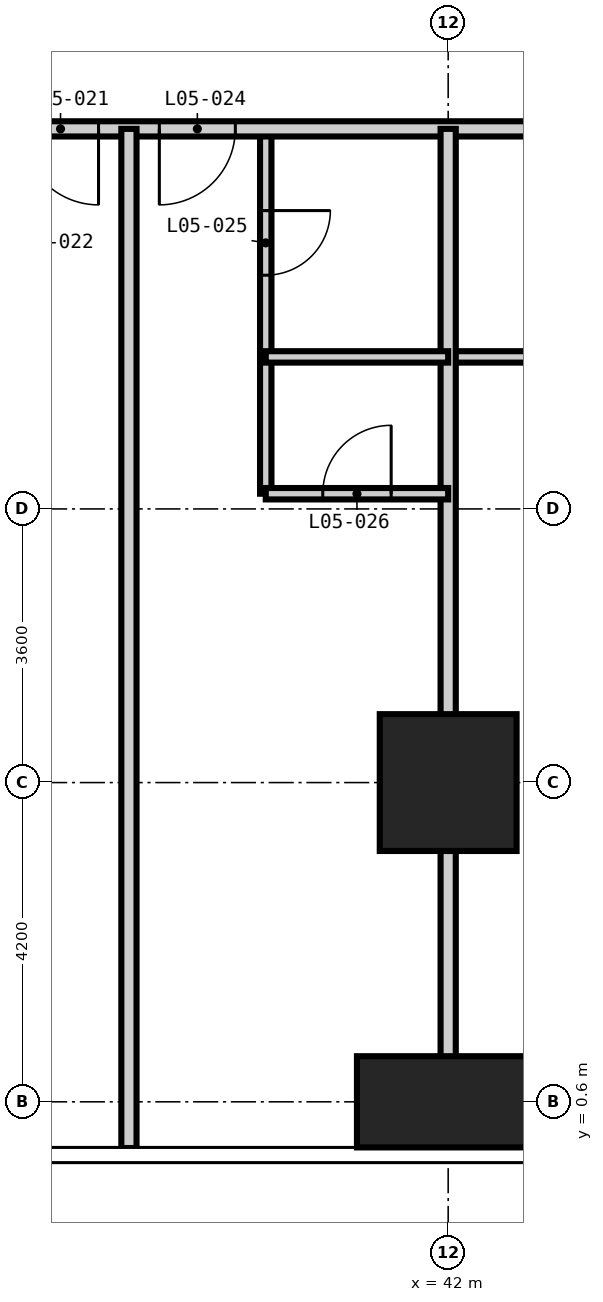
"""IFC4 building model, lengths in metres.
Left out: names, types, materials, properties, quantities, classifications, styles, units other than length and angle.
Written with IfcOpenShell. Run it as: python <this file> out.ifc"""

import sys

from ifc_helpers import new_model, si_unit, direction, frame, frame_2d, origin, origin_2d, place, context, subcontext, project, spatial, rectangle, extrude, element, fill, save


model = new_model("IFC4")
c1 = context("Model", 3, precision=1e-05, world=origin(), true_north=direction((0.0, 1.0)))
c2 = subcontext(c1, "Body", "Model", "MODEL_VIEW")
j1 = project(units=[si_unit("LENGTHUNIT", "METRE"), si_unit("PLANEANGLEUNIT", "RADIAN")], contexts=[c1])
p1 = place(None, origin())
s1 = spatial("IfcSite", under=j1, at=p1, CompositionType="ELEMENT")
p2 = place(p1, origin())
s2 = spatial("IfcBuilding", under=s1, at=p2, CompositionType="ELEMENT")
p3 = place(p2, frame((0.0, 0.0, 27.0)))
s3 = spatial("IfcBuildingStorey", under=s2, at=p3, CompositionType="ELEMENT", Elevation=27.0)
p4 = place(p3, frame((42.0, 0.6, -0.35), z_axis=(0.0, 0.0, 1.0), x_axis=(1.0, 0.0, 0.0)))
e1 = element("IfcColumn", 1, at=p4, inside=s3, PredefinedType="COLUMN", context=c2, shape_type="SweptSolid", body=[
    extrude(rectangle(XDim=2.4, YDim=1.2, at=origin_2d()), origin(), (0.0, 0.0, 1.0), 3.6),
])
p5 = place(p3, frame((42.0, 4.8, -0.35), z_axis=(0.0, 0.0, 1.0), x_axis=(1.0, 0.0, 0.0)))
e2 = element("IfcColumn", 2, at=p5, inside=s3, PredefinedType="COLUMN", context=c2, shape_type="SweptSolid", body=[
    extrude(rectangle(XDim=1.8, YDim=1.8, at=origin_2d()), origin(), (0.0, 0.0, 1.0), 3.6),
])
p6 = place(p3, frame((39.6, 10.4, 0.0), z_axis=(0.0, 0.0, 1.0), x_axis=(0.0, 1.0, 0.0)))
e3 = element("IfcWall", 3, at=p6, inside=s3, PredefinedType="PARTITIONING", context=c2, shape_type="SweptSolid", body=[
    extrude(rectangle(XDim=3.0, YDim=0.15, at=frame_2d((1.5, 0.0))), origin(), (0.0, 0.0, 1.0), 3.25),
])
p7 = place(p6, frame((1.075, 0.0, 0.0)))
e4 = element("IfcOpeningElement", 4, at=p7, cuts=e3, PredefinedType="OPENING", context=c2, shape_type="SweptSolid", body=[
    extrude(rectangle(XDim=0.85, YDim=2.1, at=frame_2d((0.425, 1.05))), frame((0.0, 0.085, 0.0), z_axis=(0.0, -1.0, 0.0), x_axis=(1.0, 0.0, 0.0)), (0.0, 0.0, 1.0), 0.17),
])
p8 = place(p3, frame((42.0, 10.4, 0.0), z_axis=(0.0, 0.0, 1.0), x_axis=(1.0, 0.0, 0.0)))
e5 = element("IfcWall", 5, at=p8, inside=s3, PredefinedType="PARTITIONING", context=c2, shape_type="SweptSolid", body=[
    extrude(rectangle(XDim=3.7, YDim=0.15, at=frame_2d((1.85, 0.0))), origin(), (0.0, 0.0, 1.0), 3.25),
])
p9 = place(p8, frame((1.425, 0.0, 0.0)))
e6 = element("IfcOpeningElement", 6, at=p9, cuts=e5, PredefinedType="OPENING", context=c2, shape_type="SweptSolid", body=[
    extrude(rectangle(XDim=0.85, YDim=2.1, at=frame_2d((0.425, 1.05))), frame((0.0, 0.085, 0.0), z_axis=(0.0, -1.0, 0.0), x_axis=(1.0, 0.0, 0.0)), (0.0, 0.0, 1.0), 0.17),
])
p10 = place(p3, frame((45.7, 13.4, 0.0), z_axis=(0.0, 0.0, 1.0), x_axis=(-1.0, 0.0, 0.0)))
e7 = element("IfcWall", 7, at=p10, inside=s3, PredefinedType="PARTITIONING", context=c2, shape_type="SweptSolid", body=[
    extrude(rectangle(XDim=32.3, YDim=0.2, at=frame_2d((16.15, 0.0))), origin(), (0.0, 0.0, 1.0), 3.25),
])
p11 = place(p10, frame((25.1, 0.0, 0.0)))
e8 = element("IfcOpeningElement", 8, at=p11, cuts=e7, PredefinedType="OPENING", context=c2, shape_type="SweptSolid", body=[
    extrude(rectangle(XDim=1.0, YDim=2.2, at=frame_2d((0.5, 1.1))), frame((0.0, 0.11, 0.0), z_axis=(0.0, -1.0, 0.0), x_axis=(1.0, 0.0, 0.0)), (0.0, 0.0, 1.0), 0.22),
])
p12 = place(p10, frame((23.3, 0.0, 0.0)))
e9 = element("IfcOpeningElement", 9, at=p12, cuts=e7, PredefinedType="OPENING", context=c2, shape_type="SweptSolid", body=[
    extrude(rectangle(XDim=1.0, YDim=2.2, at=frame_2d((0.5, 1.1))), frame((0.0, 0.11, 0.0), z_axis=(0.0, -1.0, 0.0), x_axis=(1.0, 0.0, 0.0)), (0.0, 0.0, 1.0), 0.22),
])
p13 = place(p10, frame((16.7, 0.0, 0.0)))
e10 = element("IfcOpeningElement", 10, at=p13, cuts=e7, PredefinedType="OPENING", context=c2, shape_type="SweptSolid", body=[
    extrude(rectangle(XDim=1.0, YDim=2.2, at=frame_2d((0.5, 1.1))), frame((0.0, 0.11, 0.0), z_axis=(0.0, -1.0, 0.0), x_axis=(1.0, 0.0, 0.0)), (0.0, 0.0, 1.0), 0.22),
])
p14 = place(p10, frame((14.9, 0.0, 0.0)))
e11 = element("IfcOpeningElement", 11, at=p14, cuts=e7, PredefinedType="OPENING", context=c2, shape_type="SweptSolid", body=[
    extrude(rectangle(XDim=1.0, YDim=2.2, at=frame_2d((0.5, 1.1))), frame((0.0, 0.11, 0.0), z_axis=(0.0, -1.0, 0.0), x_axis=(1.0, 0.0, 0.0)), (0.0, 0.0, 1.0), 0.22),
])
p15 = place(p10, frame((8.3, 0.0, 0.0)))
e12 = element("IfcOpeningElement", 12, at=p15, cuts=e7, PredefinedType="OPENING", context=c2, shape_type="SweptSolid", body=[
    extrude(rectangle(XDim=1.0, YDim=2.2, at=frame_2d((0.5, 1.1))), frame((0.0, 0.11, 0.0), z_axis=(0.0, -1.0, 0.0), x_axis=(1.0, 0.0, 0.0)), (0.0, 0.0, 1.0), 0.22),
])
p16 = place(p10, frame((6.5, 0.0, 0.0)))
e13 = element("IfcOpeningElement", 13, at=p16, cuts=e7, PredefinedType="OPENING", context=c2, shape_type="SweptSolid", body=[
    extrude(rectangle(XDim=1.0, YDim=2.2, at=frame_2d((0.5, 1.1))), frame((0.0, 0.11, 0.0), z_axis=(0.0, -1.0, 0.0), x_axis=(1.0, 0.0, 0.0)), (0.0, 0.0, 1.0), 0.22),
])
for number, where, z_axis, x_axis in (
    (14, (37.8, -0.008, 0.0), (0.0, 0.0, 1.0), (0.0, 1.0, 0.0)),
    (15, (42.0, -0.008, 0.0), (0.0, 0.0, 1.0), (0.0, 1.0, 0.0)),
):
    element("IfcWall", number, at=place(p3, frame(where, z_axis=z_axis, x_axis=x_axis)), inside=s3, PredefinedType="PARTITIONING", context=c2, shape_type="SweptSolid", body=[
        extrude(rectangle(XDim=13.408, YDim=0.2, at=frame_2d((6.704, 0.0))), origin(), (0.0, 0.0, 1.0), 3.25),
    ])
p17 = place(p3, frame((39.6, 8.6, 0.0), z_axis=(0.0, 0.0, 1.0), x_axis=(0.0, 1.0, 0.0)))
e16 = element("IfcWall", 16, at=p17, inside=s3, PredefinedType="PARTITIONING", context=c2, shape_type="SweptSolid", body=[
    extrude(rectangle(XDim=1.8, YDim=0.15, at=frame_2d((0.9, 0.0))), origin(), (0.0, 0.0, 1.0), 3.25),
])
p18 = place(p3, frame((39.6, 8.6, 0.0), z_axis=(0.0, 0.0, 1.0), x_axis=(1.0, 0.0, 0.0)))
e17 = element("IfcWall", 17, at=p18, inside=s3, PredefinedType="PARTITIONING", context=c2, shape_type="SweptSolid", body=[
    extrude(rectangle(XDim=2.4, YDim=0.15, at=frame_2d((1.2, 0.0))), origin(), (0.0, 0.0, 1.0), 3.25),
])
p19 = place(p18, frame((0.75, 0.0, 0.0)))
e18 = element("IfcOpeningElement", 18, at=p19, cuts=e17, PredefinedType="OPENING", context=c2, shape_type="SweptSolid", body=[
    extrude(rectangle(XDim=0.9, YDim=2.1, at=frame_2d((0.45, 1.05))), frame((0.0, 0.085, 0.0), z_axis=(0.0, -1.0, 0.0), x_axis=(1.0, 0.0, 0.0)), (0.0, 0.0, 1.0), 0.17),
])
p20 = place(p3, frame((39.6, 10.4, 0.0), z_axis=(0.0, 0.0, 1.0), x_axis=(1.0, 0.0, 0.0)))
e19 = element("IfcWall", 19, at=p20, inside=s3, PredefinedType="PARTITIONING", context=c2, shape_type="SweptSolid", body=[
    extrude(rectangle(XDim=2.4, YDim=0.15, at=frame_2d((1.2, 0.0))), origin(), (0.0, 0.0, 1.0), 3.25),
])
p21 = place(p15, origin())
e20 = element("IfcDoor", 20, at=p21, inside=s3, OperationType="SINGLE_SWING_LEFT", PredefinedType="DOOR", context=c2, shape_type="SweptSolid", body=[
    extrude(rectangle(XDim=1.0, YDim=2.2, at=frame_2d((0.5, 1.1))), frame((0.0, 0.025, 0.0), z_axis=(0.0, -1.0, 0.0), x_axis=(1.0, 0.0, 0.0)), (0.0, 0.0, 1.0), 0.05),
])
fill(e12, e20)
p22 = place(p16, origin())
e21 = element("IfcDoor", 21, at=p22, inside=s3, OperationType="SINGLE_SWING_RIGHT", PredefinedType="DOOR", context=c2, shape_type="SweptSolid", body=[
    extrude(rectangle(XDim=1.0, YDim=2.2, at=frame_2d((0.5, 1.1))), frame((0.0, 0.025, 0.0), z_axis=(0.0, -1.0, 0.0), x_axis=(1.0, 0.0, 0.0)), (0.0, 0.0, 1.0), 0.05),
])
fill(e13, e21)
p23 = place(p7, frame((0.85, 0.0, 0.0), z_axis=(0.0, 0.0, 1.0), x_axis=(-1.0, 0.0, 0.0)))
e22 = element("IfcDoor", 22, at=p23, inside=s3, OperationType="SINGLE_SWING_LEFT", PredefinedType="DOOR", context=c2, shape_type="SweptSolid", body=[
    extrude(rectangle(XDim=0.85, YDim=2.1, at=frame_2d((0.425, 1.05))), frame((0.0, 0.025, 0.0), z_axis=(0.0, -1.0, 0.0), x_axis=(1.0, 0.0, 0.0)), (0.0, 0.0, 1.0), 0.05),
])
fill(e4, e22)
p24 = place(p19, origin())
e23 = element("IfcDoor", 23, at=p24, inside=s3, OperationType="SINGLE_SWING_RIGHT", PredefinedType="DOOR", context=c2, shape_type="SweptSolid", body=[
    extrude(rectangle(XDim=0.9, YDim=2.1, at=frame_2d((0.45, 1.05))), frame((0.0, 0.025, 0.0), z_axis=(0.0, -1.0, 0.0), x_axis=(1.0, 0.0, 0.0)), (0.0, 0.0, 1.0), 0.05),
])
fill(e18, e23)
save(model, sys.argv[1])
